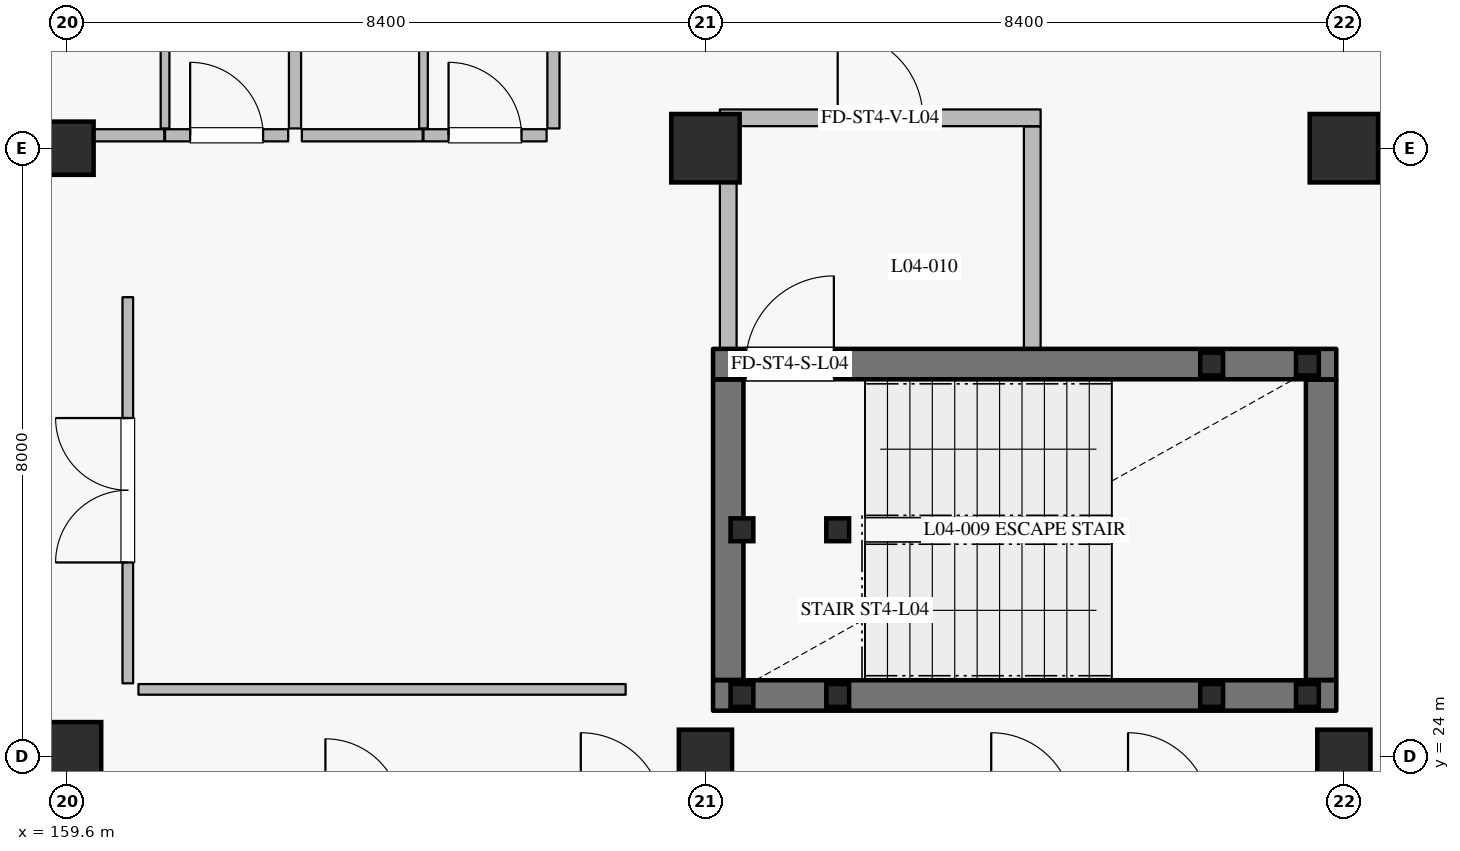
"""IFC4 building model, lengths in metres.
Left out: names, types, materials, properties, quantities, classifications, styles, units other than length and angle.
Written with IfcOpenShell. Run it as: python <this file> out.ifc"""

import sys

from ifc_helpers import new_model, si_unit, direction, frame, frame_2d, origin, origin_2d, place, context, subcontext, project, spatial, rectangle, hollow_rectangle, extrude, element, fill, save


model = new_model("IFC4")
c1 = context("Model", 3, precision=1e-05, world=origin(), true_north=direction((0.0, 1.0)))
c2 = subcontext(c1, "Body", "Model", "MODEL_VIEW")
j1 = project(units=[si_unit("LENGTHUNIT", "METRE"), si_unit("PLANEANGLEUNIT", "RADIAN")], contexts=[c1])
p1 = place(None, origin())
s1 = spatial("IfcSite", under=j1, at=p1, CompositionType="ELEMENT")
p2 = place(p1, origin())
s2 = spatial("IfcBuilding", under=s1, at=p2, CompositionType="ELEMENT")
p3 = place(p2, frame((0.0, 0.0, 21.0)))
s3 = spatial("IfcBuildingStorey", under=s2, at=p3, CompositionType="ELEMENT", Elevation=21.0)
for number, where, z_axis, x_axis in (
    (1, (159.6, 24.0, 0.0), (0.0, 0.0, 1.0), (1.0, 0.0, 0.0)),
    (2, (168.0, 32.0, 0.0), (0.0, 0.0, 1.0), (1.0, 0.0, 0.0)),
    (3, (176.4, 32.0, 0.0), (0.0, 0.0, 1.0), (1.0, 0.0, 0.0)),
):
    element("IfcColumn", number, at=place(p3, frame(where, z_axis=z_axis, x_axis=x_axis)), inside=s3, PredefinedType="COLUMN", context=c2, shape_type="SweptSolid", body=[
        extrude(rectangle(XDim=0.9, YDim=0.9, at=origin_2d()), origin(), (0.0, 0.0, 1.0), 4.2),
    ])
for number, where, z_axis, x_axis in (
    (4, (159.6, 32.0, 0.0), (0.0, 0.0, 1.0), (1.0, 0.0, 0.0)),
    (5, (168.0, 24.0, 0.0), (0.0, 0.0, 1.0), (1.0, 0.0, 0.0)),
    (6, (176.4, 24.0, 0.0), (0.0, 0.0, 1.0), (1.0, 0.0, 0.0)),
):
    element("IfcColumn", number, at=place(p3, frame(where, z_axis=z_axis, x_axis=x_axis)), inside=s3, PredefinedType="COLUMN", context=c2, shape_type="SweptSolid", body=[
        extrude(rectangle(XDim=0.7, YDim=0.7, at=origin_2d()), origin(), (0.0, 0.0, 1.0), 4.2),
    ])
p4 = place(p3, frame((168.1, 24.8, 0.0), z_axis=(0.0, 0.0, 1.0), x_axis=(1.0, 0.0, 0.0)))
e7 = element("IfcWall", 7, at=p4, inside=s3, PredefinedType="SHEAR", context=c2, shape_type="SweptSolid", body=[
    extrude(rectangle(XDim=8.2, YDim=0.4, at=frame_2d((4.1, 0.0))), origin(), (0.0, 0.0, 1.0), 3.965),
])
p5 = place(p3, frame((176.1, 25.005, 0.0), z_axis=(0.0, 0.0, 1.0), x_axis=(0.0, 1.0, 0.0)))
e8 = element("IfcWall", 8, at=p5, inside=s3, PredefinedType="SHEAR", context=c2, shape_type="SweptSolid", body=[
    extrude(rectangle(XDim=3.95, YDim=0.4, at=frame_2d((1.975, 0.0))), origin(), (0.0, 0.0, 1.0), 3.965),
])
p6 = place(p3, frame((168.1, 29.16, 0.0), z_axis=(0.0, 0.0, 1.0), x_axis=(1.0, 0.0, 0.0)))
e9 = element("IfcWall", 9, at=p6, inside=s3, PredefinedType="SHEAR", context=c2, shape_type="SweptSolid", body=[
    extrude(rectangle(XDim=8.2, YDim=0.4, at=frame_2d((4.1, 0.0))), origin(), (0.0, 0.0, 1.0), 3.965),
])
p7 = place(p6, frame((0.43, 0.0, 0.0)))
e10 = element("IfcOpeningElement", 10, at=p7, cuts=e9, PredefinedType="OPENING", context=c2, shape_type="SweptSolid", body=[
    extrude(rectangle(XDim=1.16, YDim=2.2, at=frame_2d((0.58, 1.1))), frame((0.0, 0.21, 0.0), z_axis=(0.0, -1.0, 0.0), x_axis=(1.0, 0.0, 0.0)), (0.0, 0.0, 1.0), 0.42),
])
p8 = place(p3, frame((168.3, 25.005, 0.0), z_axis=(0.0, 0.0, 1.0), x_axis=(0.0, 1.0, 0.0)))
e11 = element("IfcWall", 11, at=p8, inside=s3, PredefinedType="SHEAR", context=c2, shape_type="SweptSolid", body=[
    extrude(rectangle(XDim=3.95, YDim=0.4, at=frame_2d((1.975, 0.0))), origin(), (0.0, 0.0, 1.0), 3.965),
])
p9 = place(p3, frame((168.3, 29.365, 0.0), z_axis=(0.0, 0.0, 1.0), x_axis=(0.0, 1.0, 0.0)))
e12 = element("IfcWall", 12, at=p9, inside=s3, PredefinedType="PARTITIONING", context=c2, shape_type="SweptSolid", body=[
    extrude(rectangle(XDim=2.92, YDim=0.22, at=frame_2d((1.46, 0.0))), origin(), (0.0, 0.0, 1.0), 3.965),
])
p10 = place(p3, frame((168.19, 32.4, 0.0), z_axis=(0.0, 0.0, 1.0), x_axis=(1.0, 0.0, 0.0)))
e13 = element("IfcWall", 13, at=p10, inside=s3, PredefinedType="PARTITIONING", context=c2, shape_type="SweptSolid", body=[
    extrude(rectangle(XDim=4.22, YDim=0.22, at=frame_2d((2.11, 0.0))), origin(), (0.0, 0.0, 1.0), 3.965),
])
p11 = place(p10, frame((1.55, 0.0, 0.0)))
e14 = element("IfcOpeningElement", 14, at=p11, cuts=e13, PredefinedType="OPENING", context=c2, shape_type="SweptSolid", body=[
    extrude(rectangle(XDim=1.12, YDim=2.2, at=frame_2d((0.56, 1.1))), frame((0.0, 0.12, 0.0), z_axis=(0.0, -1.0, 0.0), x_axis=(1.0, 0.0, 0.0)), (0.0, 0.0, 1.0), 0.24),
])
p12 = place(p3, frame((172.3, 29.365, 0.0), z_axis=(0.0, 0.0, 1.0), x_axis=(0.0, 1.0, 0.0)))
e15 = element("IfcWall", 15, at=p12, inside=s3, PredefinedType="PARTITIONING", context=c2, shape_type="SweptSolid", body=[
    extrude(rectangle(XDim=2.92, YDim=0.22, at=frame_2d((1.46, 0.0))), origin(), (0.0, 0.0, 1.0), 3.965),
])
for number, where, z_axis, x_axis in (
    (16, (168.48, 24.8, 0.0), (0.0, 0.0, 1.0), (1.0, 0.0, 0.0)),
    (17, (168.48, 26.98, 0.0), (0.0, 0.0, 1.0), (1.0, 0.0, 0.0)),
    (18, (169.74, 24.8, 0.0), (0.0, 0.0, 1.0), (1.0, 0.0, 0.0)),
    (19, (169.74, 26.98, 0.0), (0.0, 0.0, 1.0), (1.0, 0.0, 0.0)),
):
    element("IfcColumn", number, at=place(p3, frame(where, z_axis=z_axis, x_axis=x_axis)), inside=s3, PredefinedType="COLUMN", context=c2, shape_type="SweptSolid", body=[
        extrude(hollow_rectangle(XDim=0.3, YDim=0.3, WallThickness=0.012, at=origin_2d()), origin(), (0.0, 0.0, 1.0), 4.02),
    ])
for number, where, z_axis, x_axis in (
    (20, (174.66, 24.8, -2.4), (0.0, 0.0, 1.0), (1.0, 0.0, 0.0)),
    (21, (174.66, 29.16, -2.4), (0.0, 0.0, 1.0), (1.0, 0.0, 0.0)),
    (22, (175.92, 24.8, -2.4), (0.0, 0.0, 1.0), (1.0, 0.0, 0.0)),
    (23, (175.92, 29.16, -2.4), (0.0, 0.0, 1.0), (1.0, 0.0, 0.0)),
):
    element("IfcColumn", number, at=place(p3, frame(where, z_axis=z_axis, x_axis=x_axis)), inside=s3, PredefinedType="COLUMN", context=c2, shape_type="SweptSolid", body=[
        extrude(hollow_rectangle(XDim=0.3, YDim=0.3, WallThickness=0.012, at=origin_2d()), origin(), (0.0, 0.0, 1.0), 4.32),
    ])
p13 = place(p3, frame((159.29, 32.17, 0.0), z_axis=(0.0, 0.0, 1.0), x_axis=(1.0, 0.0, 0.0)))
e24 = element("IfcWall", 24, at=p13, inside=s3, PredefinedType="PARTITIONING", context=c2, shape_type="SweptSolid", body=[
    extrude(rectangle(XDim=1.59, YDim=0.16, at=frame_2d((0.795, 0.0))), origin(), (0.0, 0.0, 1.0), 3.965),
])
p14 = place(p3, frame((160.89, 32.17, 0.0), z_axis=(0.0, 0.0, 1.0), x_axis=(1.0, 0.0, 0.0)))
e25 = element("IfcWall", 25, at=p14, inside=s3, PredefinedType="PARTITIONING", context=c2, shape_type="SweptSolid", body=[
    extrude(rectangle(XDim=1.62, YDim=0.16, at=frame_2d((0.81, 0.0))), origin(), (0.0, 0.0, 1.0), 3.965),
])
p15 = place(p14, frame((0.33, 0.0, 0.0)))
e26 = element("IfcOpeningElement", 26, at=p15, cuts=e25, PredefinedType="OPENING", context=c2, shape_type="SweptSolid", body=[
    extrude(rectangle(XDim=0.96, YDim=2.2, at=frame_2d((0.48, 1.1))), frame((0.0, 0.09, 0.0), z_axis=(0.0, -1.0, 0.0), x_axis=(1.0, 0.0, 0.0)), (0.0, 0.0, 1.0), 0.18),
])
p16 = place(p3, frame((160.89, 32.26, 0.0), z_axis=(0.0, 0.0, 1.0), x_axis=(0.0, 1.0, 0.0)))
e27 = element("IfcWall", 27, at=p16, inside=s3, PredefinedType="PARTITIONING", context=c2, shape_type="SweptSolid", body=[
    extrude(rectangle(XDim=2.45, YDim=0.115, at=frame_2d((1.225, 0.0))), origin(), (0.0, 0.0, 1.0), 3.965),
])
p17 = place(p3, frame((162.69, 32.17, 0.0), z_axis=(0.0, 0.0, 1.0), x_axis=(1.0, 0.0, 0.0)))
e28 = element("IfcWall", 28, at=p17, inside=s3, PredefinedType="PARTITIONING", context=c2, shape_type="SweptSolid", body=[
    extrude(rectangle(XDim=1.59, YDim=0.16, at=frame_2d((0.795, 0.0))), origin(), (0.0, 0.0, 1.0), 3.965),
])
p18 = place(p3, frame((164.29, 32.17, 0.0), z_axis=(0.0, 0.0, 1.0), x_axis=(1.0, 0.0, 0.0)))
e29 = element("IfcWall", 29, at=p18, inside=s3, PredefinedType="PARTITIONING", context=c2, shape_type="SweptSolid", body=[
    extrude(rectangle(XDim=1.62, YDim=0.16, at=frame_2d((0.81, 0.0))), origin(), (0.0, 0.0, 1.0), 3.965),
])
p19 = place(p18, frame((0.33, 0.0, 0.0)))
e30 = element("IfcOpeningElement", 30, at=p19, cuts=e29, PredefinedType="OPENING", context=c2, shape_type="SweptSolid", body=[
    extrude(rectangle(XDim=0.96, YDim=2.2, at=frame_2d((0.48, 1.1))), frame((0.0, 0.09, 0.0), z_axis=(0.0, -1.0, 0.0), x_axis=(1.0, 0.0, 0.0)), (0.0, 0.0, 1.0), 0.18),
])
p20 = place(p3, frame((164.29, 32.26, 0.0), z_axis=(0.0, 0.0, 1.0), x_axis=(0.0, 1.0, 0.0)))
e31 = element("IfcWall", 31, at=p20, inside=s3, PredefinedType="PARTITIONING", context=c2, shape_type="SweptSolid", body=[
    extrude(rectangle(XDim=2.45, YDim=0.115, at=frame_2d((1.225, 0.0))), origin(), (0.0, 0.0, 1.0), 3.965),
])
p21 = place(p3, frame((162.6, 32.26, 0.0), z_axis=(0.0, 0.0, 1.0), x_axis=(0.0, 1.0, 0.0)))
e32 = element("IfcWall", 32, at=p21, inside=s3, PredefinedType="PARTITIONING", context=c2, shape_type="SweptSolid", body=[
    extrude(rectangle(XDim=10.26, YDim=0.16, at=frame_2d((5.13, 0.0))), origin(), (0.0, 0.0, 1.0), 3.965),
])
p22 = place(p3, frame((166.0, 32.26, 0.0), z_axis=(0.0, 0.0, 1.0), x_axis=(0.0, 1.0, 0.0)))
e33 = element("IfcWall", 33, at=p22, inside=s3, PredefinedType="PARTITIONING", context=c2, shape_type="SweptSolid", body=[
    extrude(rectangle(XDim=8.64, YDim=0.16, at=frame_2d((4.32, 0.0))), origin(), (0.0, 0.0, 1.0), 3.965),
])
p23 = place(p3, frame((160.4, 24.96, 0.0), z_axis=(0.0, 0.0, 1.0), x_axis=(0.0, 1.0, 0.0)))
e34 = element("IfcWall", 34, at=p23, inside=s3, PredefinedType="PARTITIONING", context=c2, shape_type="SweptSolid", body=[
    extrude(rectangle(XDim=5.08, YDim=0.14, at=frame_2d((2.54, 0.0))), origin(), (0.0, 0.0, 1.0), 3.965),
])
p24 = place(p23, frame((1.59, 0.0, 0.0)))
e35 = element("IfcOpeningElement", 35, at=p24, cuts=e34, PredefinedType="OPENING", context=c2, shape_type="SweptSolid", body=[
    extrude(rectangle(XDim=1.9, YDim=2.4, at=frame_2d((0.95, 1.2))), frame((0.0, 0.08, 0.0), z_axis=(0.0, -1.0, 0.0), x_axis=(1.0, 0.0, 0.0)), (0.0, 0.0, 1.0), 0.16),
])
p25 = place(p3, frame((160.54, 24.88, 0.0), z_axis=(0.0, 0.0, 1.0), x_axis=(1.0, 0.0, 0.0)))
e36 = element("IfcWall", 36, at=p25, inside=s3, PredefinedType="PARTITIONING", context=c2, shape_type="SweptSolid", body=[
    extrude(rectangle(XDim=6.41, YDim=0.14, at=frame_2d((3.205, 0.0))), origin(), (0.0, 0.0, 1.0), 3.965),
])
p26 = place(p7, origin())
e37 = element("IfcDoor", 37, at=p26, inside=s3, OperationType="SINGLE_SWING_RIGHT", PredefinedType="DOOR", context=c2, shape_type="SweptSolid", body=[
    extrude(rectangle(XDim=1.16, YDim=2.2, at=frame_2d((0.58, 1.1))), frame((0.0, 0.025, 0.0), z_axis=(0.0, -1.0, 0.0), x_axis=(1.0, 0.0, 0.0)), (0.0, 0.0, 1.0), 0.05),
])
fill(e10, e37)
p27 = place(p11, origin())
e38 = element("IfcDoor", 38, at=p27, inside=s3, OperationType="SINGLE_SWING_LEFT", PredefinedType="DOOR", context=c2, shape_type="SweptSolid", body=[
    extrude(rectangle(XDim=1.12, YDim=2.2, at=frame_2d((0.56, 1.1))), frame((0.0, 0.025, 0.0), z_axis=(0.0, -1.0, 0.0), x_axis=(1.0, 0.0, 0.0)), (0.0, 0.0, 1.0), 0.05),
])
fill(e14, e38)
p28 = place(p15, origin())
e39 = element("IfcDoor", 39, at=p28, inside=s3, OperationType="SINGLE_SWING_LEFT", PredefinedType="DOOR", context=c2, shape_type="SweptSolid", body=[
    extrude(rectangle(XDim=0.96, YDim=2.2, at=frame_2d((0.48, 1.1))), frame((0.0, 0.025, 0.0), z_axis=(0.0, -1.0, 0.0), x_axis=(1.0, 0.0, 0.0)), (0.0, 0.0, 1.0), 0.05),
])
fill(e26, e39)
p29 = place(p19, origin())
e40 = element("IfcDoor", 40, at=p29, inside=s3, OperationType="SINGLE_SWING_LEFT", PredefinedType="DOOR", context=c2, shape_type="SweptSolid", body=[
    extrude(rectangle(XDim=0.96, YDim=2.2, at=frame_2d((0.48, 1.1))), frame((0.0, 0.025, 0.0), z_axis=(0.0, -1.0, 0.0), x_axis=(1.0, 0.0, 0.0)), (0.0, 0.0, 1.0), 0.05),
])
fill(e30, e40)
p30 = place(p24, origin())
e41 = element("IfcDoor", 41, at=p30, inside=s3, OperationType="DOUBLE_DOOR_SINGLE_SWING", PredefinedType="DOOR", context=c2, shape_type="SweptSolid", body=[
    extrude(rectangle(XDim=1.9, YDim=2.4, at=frame_2d((0.95, 1.2))), frame((0.0, 0.025, 0.0), z_axis=(0.0, -1.0, 0.0), x_axis=(1.0, 0.0, 0.0)), (0.0, 0.0, 1.0), 0.05),
])
fill(e35, e41)
save(model, sys.argv[1])
